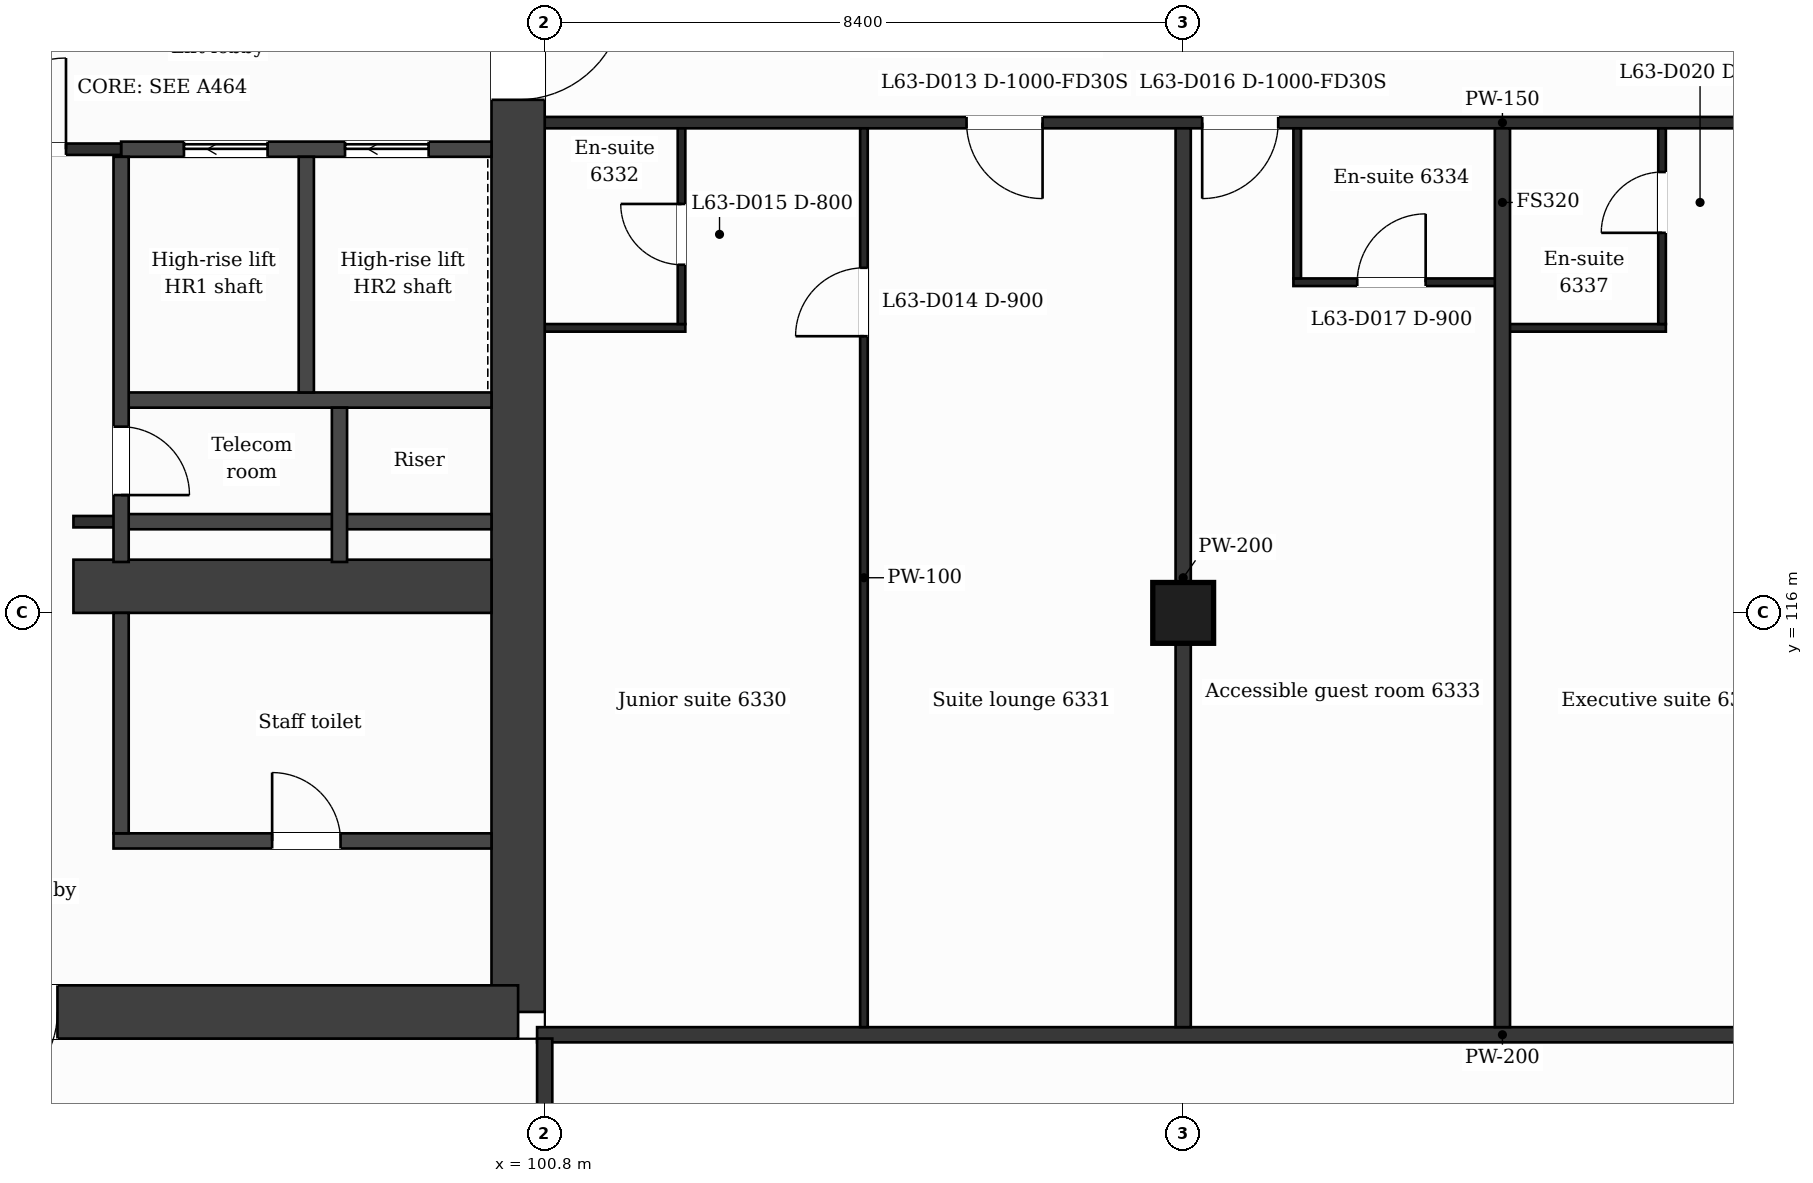
"""IFC4 building model, lengths in metres.
Left out: names, types, materials, properties, quantities, classifications, styles, units other than length and angle.
Written with IfcOpenShell. Run it as: python <this file> out.ifc"""

import sys

from ifc_helpers import new_model, si_unit, direction, frame, frame_2d, origin, origin_2d, place, context, subcontext, project, spatial, rectangle, extrude, element, fill, save


model = new_model("IFC4")
c1 = context("Model", 3, precision=1e-05, world=origin(), true_north=direction((0.0, 1.0)))
c2 = subcontext(c1, "Body", "Model", "MODEL_VIEW")
j1 = project(units=[si_unit("LENGTHUNIT", "METRE"), si_unit("PLANEANGLEUNIT", "RADIAN")], contexts=[c1])
p1 = place(None, origin())
s1 = spatial("IfcSite", under=j1, at=p1, CompositionType="ELEMENT")
p2 = place(p1, origin())
s2 = spatial("IfcBuilding", under=s1, at=p2, CompositionType="ELEMENT")
p3 = place(p2, frame((0.0, 0.0, 262.7)))
s3 = spatial("IfcBuildingStorey", under=s2, at=p3, CompositionType="ELEMENT", Elevation=262.7)
p4 = place(p3, frame((100.45, 132.05, 0.0), z_axis=(0.0, 0.0, 1.0), x_axis=(0.0, -1.0, 0.0)))
e1 = element("IfcWall", 1, at=p4, inside=s3, PredefinedType="SHEAR", context=c2, shape_type="SweptSolid", body=[
    extrude(rectangle(XDim=21.3, YDim=0.7, at=frame_2d((10.65, 0.0))), origin(), (0.0, 0.0, 1.0), 3.7),
])
p5 = place(p4, frame((7.9, 0.0, 0.0)))
e2 = element("IfcOpeningElement", 2, at=p5, cuts=e1, PredefinedType="OPENING", context=c2, shape_type="SweptSolid", body=[
    extrude(rectangle(XDim=1.4, YDim=2.1, at=frame_2d((0.7, 1.05))), frame((0.0, 0.36, 0.0), z_axis=(0.0, -1.0, 0.0), x_axis=(1.0, 0.0, 0.0)), (0.0, 0.0, 1.0), 0.72),
])
p6 = place(p3, frame((100.45, 110.75, 0.0), z_axis=(0.0, 0.0, 1.0), x_axis=(-1.0, 0.0, 0.0)))
e3 = element("IfcWall", 3, at=p6, inside=s3, PredefinedType="SHEAR", context=c2, shape_type="SweptSolid", body=[
    extrude(rectangle(XDim=14.38, YDim=0.7, at=frame_2d((7.19, 0.0))), origin(), (0.0, 0.0, 1.0), 3.7),
])
p7 = place(p6, frame((6.06, 0.0, 0.0)))
e4 = element("IfcOpeningElement", 4, at=p7, cuts=e3, PredefinedType="OPENING", context=c2, shape_type="SweptSolid", body=[
    extrude(rectangle(XDim=1.2, YDim=2.1, at=frame_2d((0.6, 1.05))), frame((0.0, 0.36, 0.0), z_axis=(0.0, -1.0, 0.0), x_axis=(1.0, 0.0, 0.0)), (0.0, 0.0, 1.0), 0.72),
])
p8 = place(p3, frame((94.6, 116.35, 0.0), z_axis=(0.0, 0.0, 1.0), x_axis=(1.0, 0.0, 0.0)))
e5 = element("IfcWall", 5, at=p8, inside=s3, PredefinedType="SHEAR", context=c2, shape_type="SweptSolid", body=[
    extrude(rectangle(XDim=5.5, YDim=0.7, at=frame_2d((2.75, 0.0))), origin(), (0.0, 0.0, 1.0), 3.7),
])
p9 = place(p3, frame((109.2, 116.0, 0.0), z_axis=(0.0, 0.0, 1.0), x_axis=(1.0, 0.0, 0.0)))
e6 = element("IfcColumn", 6, at=p9, inside=s3, PredefinedType="COLUMN", context=c2, shape_type="SweptSolid", body=[
    extrude(rectangle(XDim=0.8, YDim=0.8, at=origin_2d()), origin(), (0.0, 0.0, 1.0), 3.7),
])
p10 = place(p3, frame((100.7, 110.45, 0.0), z_axis=(0.0, 0.0, 1.0), x_axis=(1.0, 0.0, 0.0)))
e7 = element("IfcWall", 7, at=p10, inside=s3, PredefinedType="PARTITIONING", context=c2, shape_type="SweptSolid", body=[
    extrude(rectangle(XDim=25.4, YDim=0.2, at=frame_2d((12.7, 0.0))), origin(), (0.0, 0.0, 1.0), 3.38),
])
p11 = place(p3, frame((95.127, 113.0, 0.0), z_axis=(0.0, 0.0, 1.0), x_axis=(1.0, 0.0, 0.0)))
e8 = element("IfcWall", 8, at=p11, inside=s3, PredefinedType="PARTITIONING", context=c2, shape_type="SweptSolid", body=[
    extrude(rectangle(XDim=4.973, YDim=0.2, at=frame_2d((2.487, 0.0))), origin(), (0.0, 0.0, 1.0), 3.38),
])
p12 = place(p11, frame((2.087, 0.0, 0.0)))
e9 = element("IfcOpeningElement", 9, at=p12, cuts=e8, PredefinedType="OPENING", context=c2, shape_type="SweptSolid", body=[
    extrude(rectangle(XDim=0.9, YDim=2.1, at=frame_2d((0.45, 1.05))), frame((0.0, 0.11, 0.0), z_axis=(0.0, -1.0, 0.0), x_axis=(1.0, 0.0, 0.0)), (0.0, 0.0, 1.0), 0.22),
])
p13 = place(p3, frame((95.227, 117.2, 0.0), z_axis=(0.0, 0.0, 1.0), x_axis=(1.0, 0.0, 0.0)))
e10 = element("IfcWall", 10, at=p13, inside=s3, PredefinedType="PARTITIONING", context=c2, shape_type="SweptSolid", body=[
    extrude(rectangle(XDim=4.873, YDim=0.2, at=frame_2d((2.437, 0.0))), origin(), (0.0, 0.0, 1.0), 3.38),
])
p14 = place(p3, frame((94.6, 117.2, 0.0), z_axis=(0.0, 0.0, 1.0), x_axis=(1.0, 0.0, 0.0)))
e11 = element("IfcWall", 11, at=p14, inside=s3, PredefinedType="PARTITIONING", context=c2, shape_type="SweptSolid", body=[
    extrude(rectangle(XDim=0.627, YDim=0.15, at=frame_2d((0.313, 0.0))), origin(), (0.0, 0.0, 1.0), 3.38),
])
p15 = place(p3, frame((95.227, 118.8, 0.0), z_axis=(0.0, 0.0, 1.0), x_axis=(1.0, 0.0, 0.0)))
e12 = element("IfcWall", 12, at=p15, inside=s3, PredefinedType="PARTITIONING", context=c2, shape_type="SweptSolid", body=[
    extrude(rectangle(XDim=4.873, YDim=0.2, at=frame_2d((2.437, 0.0))), origin(), (0.0, 0.0, 1.0), 3.38),
])
p16 = place(p3, frame((100.8, 119.75, 0.0), z_axis=(0.0, 0.0, 1.0), x_axis=(1.0, 0.0, 0.0)))
e13 = element("IfcWall", 13, at=p16, inside=s3, PredefinedType="PARTITIONING", context=c2, shape_type="SweptSolid", body=[
    extrude(rectangle(XDim=1.85, YDim=0.1, at=frame_2d((0.925, 0.0))), origin(), (0.0, 0.0, 1.0), 3.38),
])
p17 = place(p3, frame((113.4, 119.75, 0.0), z_axis=(0.0, 0.0, 1.0), x_axis=(1.0, 0.0, 0.0)))
e14 = element("IfcWall", 14, at=p17, inside=s3, PredefinedType="PARTITIONING", context=c2, shape_type="SweptSolid", body=[
    extrude(rectangle(XDim=2.15, YDim=0.1, at=frame_2d((1.075, 0.0))), origin(), (0.0, 0.0, 1.0), 3.38),
])
p18 = place(p3, frame((110.65, 120.35, 0.0), z_axis=(0.0, 0.0, 1.0), x_axis=(1.0, 0.0, 0.0)))
e15 = element("IfcWall", 15, at=p18, inside=s3, PredefinedType="PARTITIONING", context=c2, shape_type="SweptSolid", body=[
    extrude(rectangle(XDim=2.75, YDim=0.1, at=frame_2d((1.375, 0.0))), origin(), (0.0, 0.0, 1.0), 3.38),
])
p19 = place(p18, frame((0.84, 0.0, 0.0)))
e16 = element("IfcOpeningElement", 16, at=p19, cuts=e15, PredefinedType="OPENING", context=c2, shape_type="SweptSolid", body=[
    extrude(rectangle(XDim=0.9, YDim=2.1, at=frame_2d((0.45, 1.05))), frame((0.0, 0.06, 0.0), z_axis=(0.0, -1.0, 0.0), x_axis=(1.0, 0.0, 0.0)), (0.0, 0.0, 1.0), 0.12),
])
p20 = place(p3, frame((95.227, 122.1, 0.0), z_axis=(0.0, 0.0, 1.0), x_axis=(1.0, 0.0, 0.0)))
e17 = element("IfcWall", 17, at=p20, inside=s3, PredefinedType="PARTITIONING", context=c2, shape_type="SweptSolid", body=[
    extrude(rectangle(XDim=4.873, YDim=0.2, at=frame_2d((2.437, 0.0))), origin(), (0.0, 0.0, 1.0), 3.38),
])
p21 = place(p20, frame((0.827, 0.0, 0.0)))
e18 = element("IfcOpeningElement", 18, at=p21, cuts=e17, PredefinedType="OPENING", context=c2, shape_type="SweptSolid", body=[
    extrude(rectangle(XDim=1.1, YDim=2.1, at=frame_2d((0.55, 1.05))), frame((0.0, 0.11, 0.0), z_axis=(0.0, -1.0, 0.0), x_axis=(1.0, 0.0, 0.0)), (0.0, 0.0, 1.0), 0.22),
])
p22 = place(p20, frame((2.946, 0.0, 0.0)))
e19 = element("IfcOpeningElement", 19, at=p22, cuts=e17, PredefinedType="OPENING", context=c2, shape_type="SweptSolid", body=[
    extrude(rectangle(XDim=1.1, YDim=2.1, at=frame_2d((0.55, 1.05))), frame((0.0, 0.11, 0.0), z_axis=(0.0, -1.0, 0.0), x_axis=(1.0, 0.0, 0.0)), (0.0, 0.0, 1.0), 0.22),
])
p23 = place(p3, frame((92.827, 122.1, 0.0), z_axis=(0.0, 0.0, 1.0), x_axis=(1.0, 0.0, 0.0)))
e20 = element("IfcWall", 20, at=p23, inside=s3, PredefinedType="PARTITIONING", context=c2, shape_type="SweptSolid", body=[
    extrude(rectangle(XDim=2.4, YDim=0.15, at=frame_2d((1.2, 0.0))), origin(), (0.0, 0.0, 1.0), 3.38),
])
p24 = place(p23, frame((0.475, 0.0, 0.0)))
e21 = element("IfcOpeningElement", 21, at=p24, cuts=e20, PredefinedType="OPENING", context=c2, shape_type="SweptSolid", body=[
    extrude(rectangle(XDim=1.2, YDim=2.1, at=frame_2d((0.6, 1.05))), frame((0.0, 0.085, 0.0), z_axis=(0.0, -1.0, 0.0), x_axis=(1.0, 0.0, 0.0)), (0.0, 0.0, 1.0), 0.17),
])
p25 = place(p3, frame((100.8, 122.45, 0.0), z_axis=(0.0, 0.0, 1.0), x_axis=(1.0, 0.0, 0.0)))
e22 = element("IfcWall", 22, at=p25, inside=s3, PredefinedType="PARTITIONING", context=c2, shape_type="SweptSolid", body=[
    extrude(rectangle(XDim=25.2, YDim=0.15, at=frame_2d((12.6, 0.0))), origin(), (0.0, 0.0, 1.0), 3.38),
])
p26 = place(p25, frame((5.55, 0.0, 0.0)))
e23 = element("IfcOpeningElement", 23, at=p26, cuts=e22, PredefinedType="OPENING", context=c2, shape_type="SweptSolid", body=[
    extrude(rectangle(XDim=1.0, YDim=2.1, at=frame_2d((0.5, 1.05))), frame((0.0, 0.085, 0.0), z_axis=(0.0, -1.0, 0.0), x_axis=(1.0, 0.0, 0.0)), (0.0, 0.0, 1.0), 0.17),
])
p27 = place(p25, frame((8.65, 0.0, 0.0)))
e24 = element("IfcOpeningElement", 24, at=p27, cuts=e22, PredefinedType="OPENING", context=c2, shape_type="SweptSolid", body=[
    extrude(rectangle(XDim=1.0, YDim=2.1, at=frame_2d((0.5, 1.05))), frame((0.0, 0.085, 0.0), z_axis=(0.0, -1.0, 0.0), x_axis=(1.0, 0.0, 0.0)), (0.0, 0.0, 1.0), 0.17),
])
p28 = place(p25, frame((19.83, 0.0, 0.0)))
e25 = element("IfcOpeningElement", 25, at=p28, cuts=e22, PredefinedType="OPENING", context=c2, shape_type="SweptSolid", body=[
    extrude(rectangle(XDim=1.0, YDim=2.1, at=frame_2d((0.5, 1.05))), frame((0.0, 0.085, 0.0), z_axis=(0.0, -1.0, 0.0), x_axis=(1.0, 0.0, 0.0)), (0.0, 0.0, 1.0), 0.17),
])
p29 = place(p3, frame((95.227, 113.1, 0.0), z_axis=(0.0, 0.0, 1.0), x_axis=(0.0, 1.0, 0.0)))
e26 = element("IfcWall", 26, at=p29, inside=s3, PredefinedType="PARTITIONING", context=c2, shape_type="SweptSolid", body=[
    extrude(rectangle(XDim=2.9, YDim=0.2, at=frame_2d((1.45, 0.0))), origin(), (0.0, 0.0, 1.0), 3.38),
])
p30 = place(p3, frame((95.227, 116.67, 0.0), z_axis=(0.0, 0.0, 1.0), x_axis=(0.0, 1.0, 0.0)))
e27 = element("IfcWall", 27, at=p30, inside=s3, PredefinedType="PARTITIONING", context=c2, shape_type="SweptSolid", body=[
    extrude(rectangle(XDim=5.33, YDim=0.2, at=frame_2d((2.665, 0.0))), origin(), (0.0, 0.0, 1.0), 3.38),
])
p31 = place(p30, frame((0.88, 0.0, 0.0)))
e28 = element("IfcOpeningElement", 28, at=p31, cuts=e27, PredefinedType="OPENING", context=c2, shape_type="SweptSolid", body=[
    extrude(rectangle(XDim=0.9, YDim=2.1, at=frame_2d((0.45, 1.05))), frame((0.0, 0.11, 0.0), z_axis=(0.0, -1.0, 0.0), x_axis=(1.0, 0.0, 0.0)), (0.0, 0.0, 1.0), 0.22),
])
p32 = place(p3, frame((97.664, 118.9, 0.0), z_axis=(0.0, 0.0, 1.0), x_axis=(0.0, 1.0, 0.0)))
e29 = element("IfcWall", 29, at=p32, inside=s3, PredefinedType="PARTITIONING", context=c2, shape_type="SweptSolid", body=[
    extrude(rectangle(XDim=3.1, YDim=0.2, at=frame_2d((1.55, 0.0))), origin(), (0.0, 0.0, 1.0), 3.38),
])
p33 = place(p3, frame((98.1, 116.67, 0.0), z_axis=(0.0, 0.0, 1.0), x_axis=(0.0, 1.0, 0.0)))
e30 = element("IfcWall", 30, at=p33, inside=s3, PredefinedType="PARTITIONING", context=c2, shape_type="SweptSolid", body=[
    extrude(rectangle(XDim=2.03, YDim=0.2, at=frame_2d((1.015, 0.0))), origin(), (0.0, 0.0, 1.0), 3.38),
])
p34 = place(p3, frame((100.8, 108.79, 0.0), z_axis=(0.0, 0.0, 1.0), x_axis=(0.0, 1.0, 0.0)))
e31 = element("IfcWall", 31, at=p34, inside=s3, PredefinedType="PARTITIONING", context=c2, shape_type="SweptSolid", body=[
    extrude(rectangle(XDim=1.61, YDim=0.2, at=frame_2d((0.805, 0.0))), origin(), (0.0, 0.0, 1.0), 3.38),
])
p35 = place(p3, frame((102.6, 119.8, 0.0), z_axis=(0.0, 0.0, 1.0), x_axis=(0.0, 1.0, 0.0)))
e32 = element("IfcWall", 32, at=p35, inside=s3, PredefinedType="PARTITIONING", context=c2, shape_type="SweptSolid", body=[
    extrude(rectangle(XDim=2.575, YDim=0.1, at=frame_2d((1.288, 0.0))), origin(), (0.0, 0.0, 1.0), 3.38),
])
p36 = place(p35, frame((0.78, 0.0, 0.0)))
e33 = element("IfcOpeningElement", 33, at=p36, cuts=e32, PredefinedType="OPENING", context=c2, shape_type="SweptSolid", body=[
    extrude(rectangle(XDim=0.8, YDim=2.1, at=frame_2d((0.4, 1.05))), frame((0.0, 0.06, 0.0), z_axis=(0.0, -1.0, 0.0), x_axis=(1.0, 0.0, 0.0)), (0.0, 0.0, 1.0), 0.12),
])
p37 = place(p3, frame((105.0, 110.55, 0.0), z_axis=(0.0, 0.0, 1.0), x_axis=(0.0, 1.0, 0.0)))
e34 = element("IfcWall", 34, at=p37, inside=s3, PredefinedType="PARTITIONING", context=c2, shape_type="SweptSolid", body=[
    extrude(rectangle(XDim=11.825, YDim=0.1, at=frame_2d((5.913, 0.0))), origin(), (0.0, 0.0, 1.0), 3.38),
])
p38 = place(p37, frame((9.09, 0.0, 0.0)))
e35 = element("IfcOpeningElement", 35, at=p38, cuts=e34, PredefinedType="OPENING", context=c2, shape_type="SweptSolid", body=[
    extrude(rectangle(XDim=0.9, YDim=2.1, at=frame_2d((0.45, 1.05))), frame((0.0, 0.06, 0.0), z_axis=(0.0, -1.0, 0.0), x_axis=(1.0, 0.0, 0.0)), (0.0, 0.0, 1.0), 0.12),
])
p39 = place(p3, frame((109.2, 110.55, 0.0), z_axis=(0.0, 0.0, 1.0), x_axis=(0.0, 1.0, 0.0)))
e36 = element("IfcWall", 36, at=p39, inside=s3, PredefinedType="PARTITIONING", context=c2, shape_type="SweptSolid", body=[
    extrude(rectangle(XDim=11.825, YDim=0.2, at=frame_2d((5.913, 0.0))), origin(), (0.0, 0.0, 1.0), 3.38),
])
p40 = place(p3, frame((110.7, 120.4, 0.0), z_axis=(0.0, 0.0, 1.0), x_axis=(0.0, 1.0, 0.0)))
e37 = element("IfcWall", 37, at=p40, inside=s3, PredefinedType="PARTITIONING", context=c2, shape_type="SweptSolid", body=[
    extrude(rectangle(XDim=1.975, YDim=0.1, at=frame_2d((0.988, 0.0))), origin(), (0.0, 0.0, 1.0), 3.38),
])
p41 = place(p3, frame((113.4, 110.55, 0.0), z_axis=(0.0, 0.0, 1.0), x_axis=(0.0, 1.0, 0.0)))
e38 = element("IfcWall", 38, at=p41, inside=s3, PredefinedType="PARTITIONING", context=c2, shape_type="SweptSolid", body=[
    extrude(rectangle(XDim=11.825, YDim=0.2, at=frame_2d((5.913, 0.0))), origin(), (0.0, 0.0, 1.0), 3.38),
])
p42 = place(p3, frame((115.5, 119.8, 0.0), z_axis=(0.0, 0.0, 1.0), x_axis=(0.0, 1.0, 0.0)))
e39 = element("IfcWall", 39, at=p42, inside=s3, PredefinedType="PARTITIONING", context=c2, shape_type="SweptSolid", body=[
    extrude(rectangle(XDim=2.575, YDim=0.1, at=frame_2d((1.288, 0.0))), origin(), (0.0, 0.0, 1.0), 3.38),
])
p43 = place(p42, frame((1.2, 0.0, 0.0)))
e40 = element("IfcOpeningElement", 40, at=p43, cuts=e39, PredefinedType="OPENING", context=c2, shape_type="SweptSolid", body=[
    extrude(rectangle(XDim=0.8, YDim=2.1, at=frame_2d((0.4, 1.05))), frame((0.0, 0.06, 0.0), z_axis=(0.0, -1.0, 0.0), x_axis=(1.0, 0.0, 0.0)), (0.0, 0.0, 1.0), 0.12),
])
p44 = place(p24, origin())
e41 = element("IfcDoor", 41, at=p44, inside=s3, OperationType="SINGLE_SWING_RIGHT", PredefinedType="DOOR", context=c2, shape_type="SweptSolid", body=[
    extrude(rectangle(XDim=1.2, YDim=2.1, at=frame_2d((0.6, 1.05))), frame((0.0, 0.025, 0.0), z_axis=(0.0, -1.0, 0.0), x_axis=(1.0, 0.0, 0.0)), (0.0, 0.0, 1.0), 0.05),
])
fill(e21, e41)
p45 = place(p21, origin())
e42 = element("IfcDoor", 42, at=p45, inside=s3, OperationType="SLIDING_TO_LEFT", PredefinedType="DOOR", context=c2, shape_type="SweptSolid", body=[
    extrude(rectangle(XDim=1.1, YDim=2.1, at=frame_2d((0.55, 1.05))), frame((0.0, 0.025, 0.0), z_axis=(0.0, -1.0, 0.0), x_axis=(1.0, 0.0, 0.0)), (0.0, 0.0, 1.0), 0.05),
])
fill(e18, e42)
p46 = place(p22, origin())
e43 = element("IfcDoor", 43, at=p46, inside=s3, OperationType="SLIDING_TO_LEFT", PredefinedType="DOOR", context=c2, shape_type="SweptSolid", body=[
    extrude(rectangle(XDim=1.1, YDim=2.1, at=frame_2d((0.55, 1.05))), frame((0.0, 0.025, 0.0), z_axis=(0.0, -1.0, 0.0), x_axis=(1.0, 0.0, 0.0)), (0.0, 0.0, 1.0), 0.05),
])
fill(e19, e43)
p47 = place(p31, origin())
e44 = element("IfcDoor", 44, at=p47, inside=s3, OperationType="SINGLE_SWING_LEFT", PredefinedType="DOOR", context=c2, shape_type="SweptSolid", body=[
    extrude(rectangle(XDim=0.9, YDim=2.1, at=frame_2d((0.45, 1.05))), frame((0.0, 0.025, 0.0), z_axis=(0.0, -1.0, 0.0), x_axis=(1.0, 0.0, 0.0)), (0.0, 0.0, 1.0), 0.05),
])
fill(e28, e44)
p48 = place(p12, origin())
e45 = element("IfcDoor", 45, at=p48, inside=s3, OperationType="SINGLE_SWING_LEFT", PredefinedType="DOOR", context=c2, shape_type="SweptSolid", body=[
    extrude(rectangle(XDim=0.9, YDim=2.1, at=frame_2d((0.45, 1.05))), frame((0.0, 0.025, 0.0), z_axis=(0.0, -1.0, 0.0), x_axis=(1.0, 0.0, 0.0)), (0.0, 0.0, 1.0), 0.05),
])
fill(e9, e45)
p49 = place(p26, origin())
e46 = element("IfcDoor", 46, at=p49, inside=s3, OperationType="SINGLE_SWING_RIGHT", PredefinedType="DOOR", context=c2, shape_type="SweptSolid", body=[
    extrude(rectangle(XDim=1.0, YDim=2.1, at=frame_2d((0.5, 1.05))), frame((0.0, 0.025, 0.0), z_axis=(0.0, -1.0, 0.0), x_axis=(1.0, 0.0, 0.0)), (0.0, 0.0, 1.0), 0.05),
])
fill(e23, e46)
p50 = place(p38, origin())
e47 = element("IfcDoor", 47, at=p50, inside=s3, OperationType="SINGLE_SWING_LEFT", PredefinedType="DOOR", context=c2, shape_type="SweptSolid", body=[
    extrude(rectangle(XDim=0.9, YDim=2.1, at=frame_2d((0.45, 1.05))), frame((0.0, 0.025, 0.0), z_axis=(0.0, -1.0, 0.0), x_axis=(1.0, 0.0, 0.0)), (0.0, 0.0, 1.0), 0.05),
])
fill(e35, e47)
p51 = place(p36, origin())
e48 = element("IfcDoor", 48, at=p51, inside=s3, OperationType="SINGLE_SWING_RIGHT", PredefinedType="DOOR", context=c2, shape_type="SweptSolid", body=[
    extrude(rectangle(XDim=0.8, YDim=2.1, at=frame_2d((0.4, 1.05))), frame((0.0, 0.025, 0.0), z_axis=(0.0, -1.0, 0.0), x_axis=(1.0, 0.0, 0.0)), (0.0, 0.0, 1.0), 0.05),
])
fill(e33, e48)
p52 = place(p27, origin())
e49 = element("IfcDoor", 49, at=p52, inside=s3, OperationType="SINGLE_SWING_LEFT", PredefinedType="DOOR", context=c2, shape_type="SweptSolid", body=[
    extrude(rectangle(XDim=1.0, YDim=2.1, at=frame_2d((0.5, 1.05))), frame((0.0, 0.025, 0.0), z_axis=(0.0, -1.0, 0.0), x_axis=(1.0, 0.0, 0.0)), (0.0, 0.0, 1.0), 0.05),
])
fill(e24, e49)
p53 = place(p19, origin())
e50 = element("IfcDoor", 50, at=p53, inside=s3, OperationType="SINGLE_SWING_RIGHT", PredefinedType="DOOR", context=c2, shape_type="SweptSolid", body=[
    extrude(rectangle(XDim=0.9, YDim=2.1, at=frame_2d((0.45, 1.05))), frame((0.0, 0.025, 0.0), z_axis=(0.0, -1.0, 0.0), x_axis=(1.0, 0.0, 0.0)), (0.0, 0.0, 1.0), 0.05),
])
fill(e16, e50)
p54 = place(p43, origin())
e51 = element("IfcDoor", 51, at=p54, inside=s3, OperationType="SINGLE_SWING_LEFT", PredefinedType="DOOR", context=c2, shape_type="SweptSolid", body=[
    extrude(rectangle(XDim=0.8, YDim=2.1, at=frame_2d((0.4, 1.05))), frame((0.0, 0.025, 0.0), z_axis=(0.0, -1.0, 0.0), x_axis=(1.0, 0.0, 0.0)), (0.0, 0.0, 1.0), 0.05),
])
fill(e40, e51)
p55 = place(p7, origin())
e52 = element("IfcDoor", 52, at=p55, inside=s3, OperationType="SINGLE_SWING_RIGHT", PredefinedType="DOOR", context=c2, shape_type="SweptSolid", body=[
    extrude(rectangle(XDim=1.2, YDim=2.1, at=frame_2d((0.6, 1.05))), frame((0.0, 0.025, 0.0), z_axis=(0.0, -1.0, 0.0), x_axis=(1.0, 0.0, 0.0)), (0.0, 0.0, 1.0), 0.05),
])
fill(e4, e52)
p56 = place(p5, origin())
e53 = element("IfcDoor", 53, at=p56, inside=s3, OperationType="SINGLE_SWING_LEFT", PredefinedType="DOOR", context=c2, shape_type="SweptSolid", body=[
    extrude(rectangle(XDim=1.4, YDim=2.1, at=frame_2d((0.7, 1.05))), frame((0.0, 0.025, 0.0), z_axis=(0.0, -1.0, 0.0), x_axis=(1.0, 0.0, 0.0)), (0.0, 0.0, 1.0), 0.05),
])
fill(e2, e53)
save(model, sys.argv[1])
